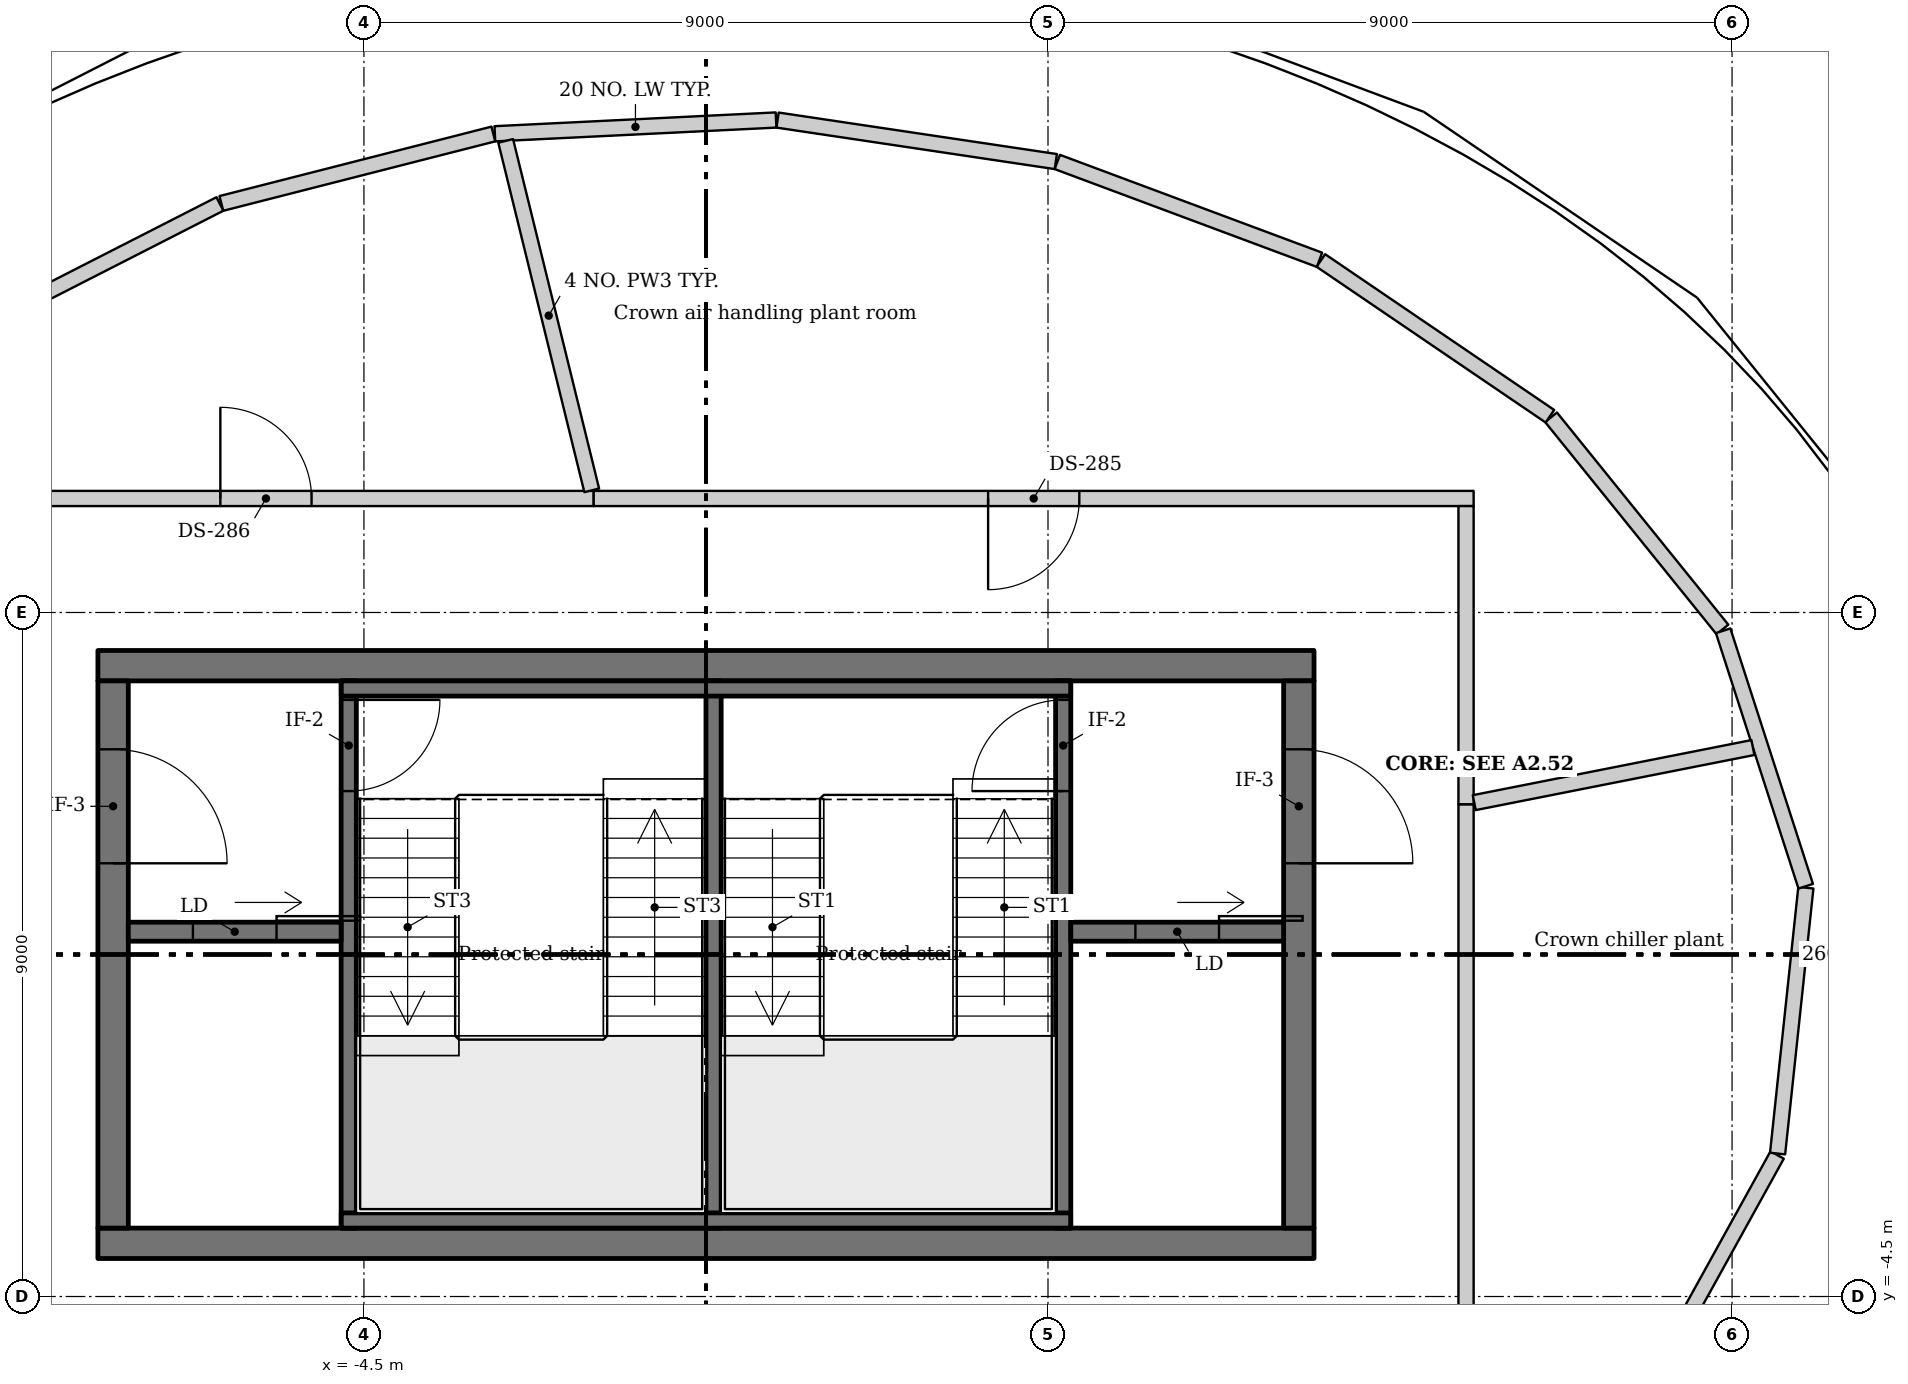
"""IFC4 building model, lengths in metres.
Left out: names, types, materials, properties, quantities, classifications, styles, units other than length and angle.
Written with IfcOpenShell. Run it as: python <this file> out.ifc"""

import sys

from ifc_helpers import new_model, si_unit, direction, frame, frame_2d, origin, place, context, subcontext, project, spatial, rectangle, extrude, source, transform, mapped, element, fill, save


model = new_model("IFC4")
c1 = context("Model", 3, precision=1e-05, world=origin(), true_north=direction((0.0, 1.0)))
c2 = subcontext(c1, "Body", "Model", "MODEL_VIEW")
j1 = project(units=[si_unit("LENGTHUNIT", "METRE"), si_unit("PLANEANGLEUNIT", "RADIAN")], contexts=[c1])
p1 = place(None, origin())
s1 = spatial("IfcSite", under=j1, at=p1, CompositionType="ELEMENT")
p2 = place(p1, origin())
s2 = spatial("IfcBuilding", under=s1, at=p2, CompositionType="ELEMENT")
p3 = place(p2, frame((0.0, 0.0, 361.0)))
s3 = spatial("IfcBuildingStorey", under=s2, at=p3, CompositionType="ELEMENT", Elevation=361.0)
m1 = source(origin(), c2, "Body", "SweptSolid", [
    extrude(rectangle(XDim=16.0, YDim=0.4, at=frame_2d((8.0, 0.0))), origin(), (0.0, 0.0, 1.0), 4.5),
])
for number, where, z_axis, x_axis in (
    (1, (-8.0, 3.8, -0.25), (0.0, 0.0, 1.0), (1.0, 0.0, 0.0)),
    (2, (-8.0, -3.8, -0.25), (0.0, 0.0, 1.0), (1.0, 0.0, 0.0)),
):
    element("IfcWall", number, at=place(p3, frame(where, z_axis=z_axis, x_axis=x_axis)), inside=s3, PredefinedType="SHEAR", context=c2, shape_type="MappedRepresentation", body=[
        mapped(m1, transform((0.0, 0.0, 0.0))),
    ])
m2 = source(origin(), c2, "Body", "SweptSolid", [
    extrude(rectangle(XDim=7.2, YDim=0.4, at=frame_2d((3.6, 0.0))), origin(), (0.0, 0.0, 1.0), 4.5),
])
p4 = place(p3, frame((7.8, -3.6, -0.25), z_axis=(0.0, 0.0, 1.0), x_axis=(0.0, 1.0, 0.0)))
e3 = element("IfcWall", 3, at=p4, inside=s3, PredefinedType="SHEAR", context=c2, shape_type="MappedRepresentation", body=[
    mapped(m2, transform((0.0, 0.0, 0.0))),
])
m3 = source(origin(), c2, "Body", "SweptSolid", [
    extrude(rectangle(XDim=1.5, YDim=2.1, at=frame_2d((0.75, 1.05))), frame((0.0, 0.21, 0.0), z_axis=(0.0, -1.0, 0.0), x_axis=(1.0, 0.0, 0.0)), (0.0, 0.0, 1.0), 0.42),
])
p5 = place(p4, frame((4.8, 0.0, 0.25)))
e4 = element("IfcOpeningElement", 4, at=p5, cuts=e3, PredefinedType="OPENING", context=c2, shape_type="MappedRepresentation", body=[
    mapped(m3, transform((0.0, 0.0, 0.0))),
])
p6 = place(p3, frame((-7.8, -3.6, -0.25), z_axis=(0.0, 0.0, 1.0), x_axis=(0.0, 1.0, 0.0)))
e5 = element("IfcWall", 5, at=p6, inside=s3, PredefinedType="SHEAR", context=c2, shape_type="MappedRepresentation", body=[
    mapped(m2, transform((0.0, 0.0, 0.0))),
])
p7 = place(p6, frame((4.8, 0.0, 0.25)))
e6 = element("IfcOpeningElement", 6, at=p7, cuts=e5, PredefinedType="OPENING", context=c2, shape_type="MappedRepresentation", body=[
    mapped(m3, transform((0.0, 0.0, 0.0))),
])
m4 = source(origin(), c2, "Body", "SweptSolid", [
    extrude(rectangle(XDim=3.589, YDim=0.2, at=frame_2d((1.794, 0.0))), origin(), (0.0, 0.0, 1.0), 4.25),
])
p8 = place(p3, frame((11.118, 7.069, 0.0), z_axis=(0.0, 0.0, 1.0), x_axis=(0.62833869063, -0.777939901186, 0.0)))
e7 = element("IfcWall", 7, at=p8, inside=s3, PredefinedType="SOLIDWALL", context=c2, shape_type="MappedRepresentation", body=[
    mapped(m4, transform((0.0, 0.0, 0.0))),
])
m5 = source(origin(), c2, "Body", "SweptSolid", [
    extrude(rectangle(XDim=3.645, YDim=0.2, at=frame_2d((1.823, 0.0))), origin(), (0.0, 0.0, 1.0), 4.25),
])
p9 = place(p3, frame((8.09, 9.132, 0.0), z_axis=(0.0, 0.0, 1.0), x_axis=(0.826956398418, -0.562266053675, 0.0)))
e8 = element("IfcWall", 8, at=p9, inside=s3, PredefinedType="SOLIDWALL", context=c2, shape_type="MappedRepresentation", body=[
    mapped(m5, transform((0.0, 0.0, 0.0))),
])
m6 = source(origin(), c2, "Body", "SweptSolid", [
    extrude(rectangle(XDim=3.682, YDim=0.2, at=frame_2d((1.841, 0.0))), origin(), (0.0, 0.0, 1.0), 4.25),
])
p10 = place(p3, frame((4.622, 10.428, 0.0), z_axis=(0.0, 0.0, 1.0), x_axis=(0.936897406931, -0.349604417716, 0.0)))
e9 = element("IfcWall", 9, at=p10, inside=s3, PredefinedType="SOLIDWALL", context=c2, shape_type="MappedRepresentation", body=[
    mapped(m6, transform((0.0, 0.0, 0.0))),
])
m7 = source(origin(), c2, "Body", "SweptSolid", [
    extrude(rectangle(XDim=3.701, YDim=0.2, at=frame_2d((1.851, 0.0))), origin(), (0.0, 0.0, 1.0), 4.25),
])
p11 = place(p3, frame((0.942, 10.979, 0.0), z_axis=(0.0, 0.0, 1.0), x_axis=(0.989053133618, -0.147559814586, 0.0)))
e10 = element("IfcWall", 10, at=p11, inside=s3, PredefinedType="SOLIDWALL", context=c2, shape_type="MappedRepresentation", body=[
    mapped(m7, transform((0.0, 0.0, 0.0))),
])
m8 = source(origin(), c2, "Body", "SweptSolid", [
    extrude(rectangle(XDim=3.704, YDim=0.2, at=frame_2d((1.852, 0.0))), origin(), (0.0, 0.0, 1.0), 4.25),
])
p12 = place(p3, frame((-2.777, 10.799, 0.0), z_axis=(0.0, 0.0, 1.0), x_axis=(0.998800036237, 0.04897435669, 0.0)))
e11 = element("IfcWall", 11, at=p12, inside=s3, PredefinedType="SOLIDWALL", context=c2, shape_type="MappedRepresentation", body=[
    mapped(m8, transform((0.0, 0.0, 0.0))),
])
m9 = source(origin(), c2, "Body", "SweptSolid", [
    extrude(rectangle(XDim=3.694, YDim=0.2, at=frame_2d((1.847, 0.0))), origin(), (0.0, 0.0, 1.0), 4.25),
])
p13 = place(p3, frame((-6.376, 9.882, 0.0), z_axis=(0.0, 0.0, 1.0), x_axis=(0.968929170675, 0.247338355731, 0.0)))
e12 = element("IfcWall", 12, at=p13, inside=s3, PredefinedType="SOLIDWALL", context=c2, shape_type="MappedRepresentation", body=[
    mapped(m9, transform((0.0, 0.0, 0.0))),
])
m10 = source(origin(), c2, "Body", "SweptSolid", [
    extrude(rectangle(XDim=3.666, YDim=0.2, at=frame_2d((1.833, 0.0))), origin(), (0.0, 0.0, 1.0), 4.25),
])
p14 = place(p3, frame((-9.66, 8.208, 0.0), z_axis=(0.0, 0.0, 1.0), x_axis=(0.89069419258, 0.454602964469, 0.0)))
e13 = element("IfcWall", 13, at=p14, inside=s3, PredefinedType="SOLIDWALL", context=c2, shape_type="MappedRepresentation", body=[
    mapped(m10, transform((0.0, 0.0, 0.0))),
])
m11 = source(origin(), c2, "Body", "SweptSolid", [
    extrude(rectangle(XDim=3.559, YDim=0.2, at=frame_2d((1.779, 0.0))), origin(), (0.0, 0.0, 1.0), 4.25),
])
p15 = place(p3, frame((14.093, -2.638, 0.0), z_axis=(0.0, 0.0, 1.0), x_axis=(-0.483958553542, -0.875090920107, 0.0)))
e14 = element("IfcWall", 14, at=p15, inside=s3, PredefinedType="SOLIDWALL", context=c2, shape_type="MappedRepresentation", body=[
    mapped(m11, transform((0.0, 0.0, 0.0))),
])
m12 = source(origin(), c2, "Body", "SweptSolid", [
    extrude(rectangle(XDim=3.518, YDim=0.2, at=frame_2d((1.759, 0.0))), origin(), (0.0, 0.0, 1.0), 4.25),
])
p16 = place(p3, frame((14.471, 0.879, 0.0), z_axis=(0.0, 0.0, 1.0), x_axis=(-0.105775833098, -0.994390000519, 0.0)))
e15 = element("IfcWall", 15, at=p16, inside=s3, PredefinedType="SOLIDWALL", context=c2, shape_type="MappedRepresentation", body=[
    mapped(m12, transform((0.0, 0.0, 0.0))),
])
m13 = source(origin(), c2, "Body", "SweptSolid", [
    extrude(rectangle(XDim=3.532, YDim=0.2, at=frame_2d((1.766, 0.0))), origin(), (0.0, 0.0, 1.0), 4.25),
])
p17 = place(p3, frame((13.383, 4.26, 0.0), z_axis=(0.0, 0.0, 1.0), x_axis=(0.307547938379, -0.951532587776, 0.0)))
e16 = element("IfcWall", 16, at=p17, inside=s3, PredefinedType="SOLIDWALL", context=c2, shape_type="MappedRepresentation", body=[
    mapped(m13, transform((0.0, 0.0, 0.0))),
])
m14 = source(origin(), c2, "Body", "SweptSolid", [
    extrude(rectangle(XDim=7.2, YDim=0.2, at=frame_2d((3.6, 0.0))), origin(), (0.0, 0.0, 1.0), 4.25),
])
p18 = place(p3, frame((0.1, 3.6, 0.0), z_axis=(0.0, 0.0, 1.0), x_axis=(0.0, -1.0, 0.0)))
e17 = element("IfcWall", 17, at=p18, inside=s3, PredefinedType="SHEAR", context=c2, shape_type="MappedRepresentation", body=[
    mapped(m14, transform((0.0, 0.0, 0.0))),
])
p19 = place(p3, frame((4.7, -3.6, 0.0), z_axis=(0.0, 0.0, 1.0), x_axis=(0.0, 1.0, 0.0)))
e18 = element("IfcWall", 18, at=p19, inside=s3, PredefinedType="SHEAR", context=c2, shape_type="MappedRepresentation", body=[
    mapped(m14, transform((0.0, 0.0, 0.0))),
])
m15 = source(origin(), c2, "Body", "SweptSolid", [
    extrude(rectangle(XDim=1.2, YDim=2.1, at=frame_2d((0.6, 1.05))), frame((0.0, 0.11, 0.0), z_axis=(0.0, -1.0, 0.0), x_axis=(1.0, 0.0, 0.0)), (0.0, 0.0, 1.0), 0.22),
])
p20 = place(p19, frame((5.75, 0.0, 0.0)))
e19 = element("IfcOpeningElement", 19, at=p20, cuts=e18, PredefinedType="OPENING", context=c2, shape_type="MappedRepresentation", body=[
    mapped(m15, transform((0.0, 0.0, 0.0))),
])
p21 = place(p3, frame((-4.7, 3.6, 0.0), z_axis=(0.0, 0.0, 1.0), x_axis=(0.0, -1.0, 0.0)))
e20 = element("IfcWall", 20, at=p21, inside=s3, PredefinedType="SHEAR", context=c2, shape_type="MappedRepresentation", body=[
    mapped(m14, transform((0.0, 0.0, 0.0))),
])
p22 = place(p21, frame((0.25, 0.0, 0.0)))
e21 = element("IfcOpeningElement", 21, at=p22, cuts=e20, PredefinedType="OPENING", context=c2, shape_type="MappedRepresentation", body=[
    mapped(m15, transform((0.0, 0.0, 0.0))),
])
m16 = source(origin(), c2, "Body", "SweptSolid", [
    extrude(rectangle(XDim=2.8, YDim=0.25, at=frame_2d((1.4, 0.0))), origin(), (0.0, 0.0, 1.0), 4.25),
])
p23 = place(p3, frame((7.6, 0.3, 0.0), z_axis=(0.0, 0.0, 1.0), x_axis=(-1.0, 0.0, 0.0)))
e22 = element("IfcWall", 22, at=p23, inside=s3, PredefinedType="SHEAR", context=c2, shape_type="MappedRepresentation", body=[
    mapped(m16, transform((0.0, 0.0, 0.0))),
])
m17 = source(origin(), c2, "Body", "SweptSolid", [
    extrude(rectangle(XDim=1.1, YDim=2.1, at=frame_2d((0.55, 1.05))), frame((0.0, 0.135, 0.0), z_axis=(0.0, -1.0, 0.0), x_axis=(1.0, 0.0, 0.0)), (0.0, 0.0, 1.0), 0.27),
])
p24 = place(p23, frame((0.85, 0.0, 0.0)))
e23 = element("IfcOpeningElement", 23, at=p24, cuts=e22, PredefinedType="OPENING", context=c2, shape_type="MappedRepresentation", body=[
    mapped(m17, transform((0.0, 0.0, 0.0))),
])
p25 = place(p3, frame((-4.8, 0.3, 0.0), z_axis=(0.0, 0.0, 1.0), x_axis=(-1.0, 0.0, 0.0)))
e24 = element("IfcWall", 24, at=p25, inside=s3, PredefinedType="SHEAR", context=c2, shape_type="MappedRepresentation", body=[
    mapped(m16, transform((0.0, 0.0, 0.0))),
])
p26 = place(p25, frame((0.85, 0.0, 0.0)))
e25 = element("IfcOpeningElement", 25, at=p26, cuts=e24, PredefinedType="OPENING", context=c2, shape_type="MappedRepresentation", body=[
    mapped(m17, transform((0.0, 0.0, 0.0))),
])
m18 = source(origin(), c2, "Body", "SweptSolid", [
    extrude(rectangle(XDim=9.596, YDim=0.2, at=frame_2d((4.798, 0.0))), origin(), (0.0, 0.0, 1.0), 4.25),
])
for number, where, z_axis, x_axis in (
    (26, (-4.798, -3.5, 0.0), (0.0, 0.0, 1.0), (1.0, 0.0, 0.0)),
    (27, (4.798, 3.5, 0.0), (0.0, 0.0, 1.0), (-1.0, 0.0, 0.0)),
):
    element("IfcWall", number, at=place(p3, frame(where, z_axis=z_axis, x_axis=x_axis)), inside=s3, PredefinedType="SHEAR", context=c2, shape_type="MappedRepresentation", body=[
        mapped(m18, transform((0.0, 0.0, 0.0))),
    ])
m19 = source(origin(), c2, "Body", "SweptSolid", [
    extrude(rectangle(XDim=8.623, YDim=0.2, at=frame_2d((4.312, 0.0))), origin(), (0.0, 0.0, 1.0), 4.25),
])
p27 = place(p3, frame((-10.1, 6.0, 0.0), z_axis=(0.0, 0.0, 1.0), x_axis=(1.0, 0.0, 0.0)))
e28 = element("IfcWall", 28, at=p27, inside=s3, PredefinedType="PARTITIONING", context=c2, shape_type="MappedRepresentation", body=[
    mapped(m19, transform((0.0, 0.0, 0.0))),
])
p28 = place(p27, frame((3.711, 0.0, 0.0)))
e29 = element("IfcOpeningElement", 29, at=p28, cuts=e28, PredefinedType="OPENING", context=c2, shape_type="MappedRepresentation", body=[
    mapped(m15, transform((0.0, 0.0, 0.0))),
])
m20 = source(origin(), c2, "Body", "SweptSolid", [
    extrude(rectangle(XDim=4.735, YDim=0.2, at=frame_2d((2.368, 0.0))), origin(), (0.0, 0.0, 1.0), 4.25),
])
p29 = place(p3, frame((-1.503, 6.107, 0.0), z_axis=(0.0, 0.0, 1.0), x_axis=(-0.239064665941, 0.971003648551, 0.0)))
e30 = element("IfcWall", 30, at=p29, inside=s3, PredefinedType="PARTITIONING", context=c2, shape_type="MappedRepresentation", body=[
    mapped(m20, transform((0.0, 0.0, 0.0))),
])
m21 = source(origin(), c2, "Body", "SweptSolid", [
    extrude(rectangle(XDim=11.577, YDim=0.2, at=frame_2d((5.789, 0.0))), origin(), (0.0, 0.0, 1.0), 4.25),
])
p30 = place(p3, frame((-1.477, 6.0, 0.0), z_axis=(0.0, 0.0, 1.0), x_axis=(1.0, 0.0, 0.0)))
e31 = element("IfcWall", 31, at=p30, inside=s3, PredefinedType="PARTITIONING", context=c2, shape_type="MappedRepresentation", body=[
    mapped(m21, transform((0.0, 0.0, 0.0))),
])
p31 = place(p30, frame((5.189, 0.0, 0.0)))
e32 = element("IfcOpeningElement", 32, at=p31, cuts=e31, PredefinedType="OPENING", context=c2, shape_type="MappedRepresentation", body=[
    mapped(m15, transform((0.0, 0.0, 0.0))),
])
m22 = source(origin(), c2, "Body", "SweptSolid", [
    extrude(rectangle(XDim=7.877, YDim=0.2, at=frame_2d((3.938, 0.0))), origin(), (0.0, 0.0, 1.0), 4.25),
])
p32 = place(p3, frame((10.0, 1.977, 0.0), z_axis=(0.0, 0.0, 1.0), x_axis=(0.0, -1.0, 0.0)))
e33 = element("IfcWall", 33, at=p32, inside=s3, PredefinedType="PARTITIONING", context=c2, shape_type="MappedRepresentation", body=[
    mapped(m22, transform((0.0, 0.0, 0.0))),
])
m23 = source(origin(), c2, "Body", "SweptSolid", [
    extrude(rectangle(XDim=3.923, YDim=0.2, at=frame_2d((1.961, 0.0))), origin(), (0.0, 0.0, 1.0), 4.25),
])
p33 = place(p3, frame((10.0, 5.9, 0.0), z_axis=(0.0, 0.0, 1.0), x_axis=(0.0, -1.0, 0.0)))
e34 = element("IfcWall", 34, at=p33, inside=s3, PredefinedType="PARTITIONING", context=c2, shape_type="MappedRepresentation", body=[
    mapped(m23, transform((0.0, 0.0, 0.0))),
])
m24 = source(origin(), c2, "Body", "SweptSolid", [
    extrude(rectangle(XDim=3.737, YDim=0.2, at=frame_2d((1.869, 0.0))), origin(), (0.0, 0.0, 1.0), 4.25),
])
p34 = place(p3, frame((13.774, 2.723, 0.0), z_axis=(0.0, 0.0, 1.0), x_axis=(-0.981007998173, -0.193967284668, 0.0)))
e35 = element("IfcWall", 35, at=p34, inside=s3, PredefinedType="PARTITIONING", context=c2, shape_type="MappedRepresentation", body=[
    mapped(m24, transform((0.0, 0.0, 0.0))),
])
m25 = source(origin(), c2, "Body", "SweptSolid", [
    extrude(rectangle(XDim=1.1, YDim=2.1, at=frame_2d((0.55, 1.05))), frame((0.0, 0.025, 0.0), z_axis=(0.0, -1.0, 0.0), x_axis=(1.0, 0.0, 0.0)), (0.0, 0.0, 1.0), 0.05),
])
p35 = place(p24, origin())
e36 = element("IfcDoor", 36, at=p35, inside=s3, OperationType="SLIDING_TO_LEFT", PredefinedType="DOOR", context=c2, shape_type="MappedRepresentation", body=[
    mapped(m25, transform((0.0, 0.0, 0.0))),
])
fill(e23, e36)
m26 = source(origin(), c2, "Body", "SweptSolid", [
    extrude(rectangle(XDim=1.2, YDim=2.1, at=frame_2d((0.6, 1.05))), frame((0.0, 0.025, 0.0), z_axis=(0.0, -1.0, 0.0), x_axis=(1.0, 0.0, 0.0)), (0.0, 0.0, 1.0), 0.05),
])
p36 = place(p20, origin())
e37 = element("IfcDoor", 37, at=p36, inside=s3, OperationType="SINGLE_SWING_LEFT", PredefinedType="DOOR", context=c2, shape_type="MappedRepresentation", body=[
    mapped(m26, transform((0.0, 0.0, 0.0))),
])
fill(e19, e37)
p37 = place(p26, origin())
e38 = element("IfcDoor", 38, at=p37, inside=s3, OperationType="SLIDING_TO_LEFT", PredefinedType="DOOR", context=c2, shape_type="MappedRepresentation", body=[
    mapped(m25, transform((0.0, 0.0, 0.0))),
])
fill(e25, e38)
p38 = place(p22, origin())
e39 = element("IfcDoor", 39, at=p38, inside=s3, OperationType="SINGLE_SWING_RIGHT", PredefinedType="DOOR", context=c2, shape_type="MappedRepresentation", body=[
    mapped(m26, transform((0.0, 0.0, 0.0))),
])
fill(e21, e39)
m27 = source(origin(), c2, "Body", "SweptSolid", [
    extrude(rectangle(XDim=1.5, YDim=2.1, at=frame_2d((0.75, 1.05))), frame((0.0, 0.025, 0.0), z_axis=(0.0, -1.0, 0.0), x_axis=(1.0, 0.0, 0.0)), (0.0, 0.0, 1.0), 0.05),
])
p39 = place(p5, origin())
e40 = element("IfcDoor", 40, at=p39, inside=s3, OperationType="DOUBLE_DOOR_SINGLE_SWING", PredefinedType="DOOR", context=c2, shape_type="MappedRepresentation", body=[
    mapped(m27, transform((0.0, 0.0, 0.0))),
])
fill(e4, e40)
p40 = place(p7, origin())
e41 = element("IfcDoor", 41, at=p40, inside=s3, OperationType="DOUBLE_DOOR_SINGLE_SWING", PredefinedType="DOOR", context=c2, shape_type="MappedRepresentation", body=[
    mapped(m27, transform((0.0, 0.0, 0.0))),
])
fill(e6, e41)
m28 = source(origin(), c2, "Body", "SweptSolid", [
    extrude(rectangle(XDim=1.2, YDim=2.1, at=frame_2d((0.6, 1.05))), frame((0.0, 0.025, 0.0), z_axis=(0.0, -1.0, 0.0), x_axis=(1.0, 0.0, 0.0)), (0.0, 0.0, 1.0), 0.05),
])
p41 = place(p31, origin())
e42 = element("IfcDoor", 42, at=p41, inside=s3, OperationType="SINGLE_SWING_LEFT", PredefinedType="DOOR", context=c2, shape_type="MappedRepresentation", body=[
    mapped(m28, transform((0.0, 0.0, 0.0))),
])
fill(e32, e42)
p42 = place(p28, origin())
e43 = element("IfcDoor", 43, at=p42, inside=s3, OperationType="SINGLE_SWING_LEFT", PredefinedType="DOOR", context=c2, shape_type="MappedRepresentation", body=[
    mapped(m28, transform((0.0, 0.0, 0.0))),
])
fill(e29, e43)
save(model, sys.argv[1])
